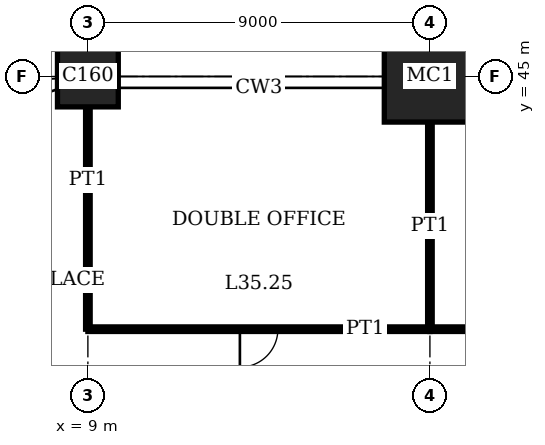
"""IFC4 building model, lengths in metres.
Left out: names, types, materials, properties, quantities, classifications, styles, units other than length and angle.
Written with IfcOpenShell. Run it as: python <this file> out.ifc"""

import sys

from ifc_helpers import new_model, si_unit, direction, frame, frame_2d, origin, origin_2d, place, context, subcontext, project, spatial, rectangle, extrude, element, fill, save


model = new_model("IFC4")
c1 = context("Model", 3, precision=1e-05, world=origin(), true_north=direction((0.0, 1.0)))
c2 = subcontext(c1, "Body", "Model", "MODEL_VIEW")
j1 = project(units=[si_unit("LENGTHUNIT", "METRE"), si_unit("PLANEANGLEUNIT", "RADIAN")], contexts=[c1])
p1 = place(None, origin())
s1 = spatial("IfcSite", under=j1, at=p1, CompositionType="ELEMENT")
p2 = place(p1, origin())
s2 = spatial("IfcBuilding", under=s1, at=p2, CompositionType="ELEMENT")
p3 = place(p2, frame((0.0, 0.0, 145.0)))
s3 = spatial("IfcBuildingStorey", under=s2, at=p3, CompositionType="ELEMENT", Elevation=145.0)
p4 = place(p3, frame((9.0, 45.0, 0.0), z_axis=(0.0, 0.0, 1.0), x_axis=(1.0, 0.0, 0.0)))
e1 = element("IfcColumn", 1, at=p4, inside=s3, PredefinedType="COLUMN", context=c2, shape_type="SweptSolid", body=[
    extrude(rectangle(XDim=1.6, YDim=1.6, at=origin_2d()), origin(), (0.0, 0.0, 1.0), 4.0),
])
p5 = place(p3, frame((18.0, 45.0, 0.0), z_axis=(0.0, 0.0, 1.0), x_axis=(1.0, 0.0, 0.0)))
e2 = element("IfcColumn", 2, at=p5, inside=s3, PredefinedType="COLUMN", context=c2, shape_type="SweptSolid", body=[
    extrude(rectangle(XDim=2.4, YDim=2.4, at=origin_2d()), origin(), (0.0, 0.0, 1.0), 4.0),
])
p6 = place(p3, frame((9.0, 38.35, 0.0), z_axis=(0.0, 0.0, 1.0), x_axis=(1.0, 0.0, 0.0)))
e3 = element("IfcWall", 3, at=p6, inside=s3, PredefinedType="PARTITIONING", context=c2, shape_type="SweptSolid", body=[
    extrude(rectangle(XDim=9.0, YDim=0.12, at=frame_2d((4.5, 0.0))), origin(), (0.0, 0.0, 1.0), 3.75),
])
p7 = place(p6, frame((4.0, 0.0, 0.0)))
e4 = element("IfcOpeningElement", 4, at=p7, cuts=e3, PredefinedType="OPENING", context=c2, shape_type="SweptSolid", body=[
    extrude(rectangle(XDim=1.0, YDim=2.4, at=frame_2d((0.5, 1.2))), frame((0.0, 0.07, 0.0), z_axis=(0.0, -1.0, 0.0), x_axis=(1.0, 0.0, 0.0)), (0.0, 0.0, 1.0), 0.14),
])
p8 = place(p3, frame((18.0, 38.35, 0.0), z_axis=(0.0, 0.0, 1.0), x_axis=(1.0, 0.0, 0.0)))
e5 = element("IfcWall", 5, at=p8, inside=s3, PredefinedType="PARTITIONING", context=c2, shape_type="SweptSolid", body=[
    extrude(rectangle(XDim=9.0, YDim=0.12, at=frame_2d((4.5, 0.0))), origin(), (0.0, 0.0, 1.0), 3.75),
])
p9 = place(p8, frame((4.0, 0.0, 0.0)))
e6 = element("IfcOpeningElement", 6, at=p9, cuts=e5, PredefinedType="OPENING", context=c2, shape_type="SweptSolid", body=[
    extrude(rectangle(XDim=1.0, YDim=2.4, at=frame_2d((0.5, 1.2))), frame((0.0, 0.07, 0.0), z_axis=(0.0, -1.0, 0.0), x_axis=(1.0, 0.0, 0.0)), (0.0, 0.0, 1.0), 0.14),
])
p10 = place(p3, frame((9.0, 38.35, 0.0), z_axis=(0.0, 0.0, 1.0), x_axis=(0.0, 1.0, 0.0)))
e7 = element("IfcWall", 7, at=p10, inside=s3, PredefinedType="PARTITIONING", context=c2, shape_type="SweptSolid", body=[
    extrude(rectangle(XDim=5.85, YDim=0.12, at=frame_2d((2.925, 0.0))), origin(), (0.0, 0.0, 1.0), 3.05),
])
p11 = place(p3, frame((18.0, 38.35, 0.0), z_axis=(0.0, 0.0, 1.0), x_axis=(0.0, 1.0, 0.0)))
e8 = element("IfcWall", 8, at=p11, inside=s3, PredefinedType="PARTITIONING", context=c2, shape_type="SweptSolid", body=[
    extrude(rectangle(XDim=5.45, YDim=0.12, at=frame_2d((2.725, 0.0))), origin(), (0.0, 0.0, 1.0), 3.05),
])
p12 = place(p7, origin())
e9 = element("IfcDoor", 9, at=p12, inside=s3, OperationType="SINGLE_SWING_LEFT", PredefinedType="DOOR", context=c2, shape_type="SweptSolid", body=[
    extrude(rectangle(XDim=1.0, YDim=2.4, at=frame_2d((0.5, 1.2))), frame((0.0, 0.025, 0.0), z_axis=(0.0, -1.0, 0.0), x_axis=(1.0, 0.0, 0.0)), (0.0, 0.0, 1.0), 0.05),
])
fill(e4, e9)
save(model, sys.argv[1])
